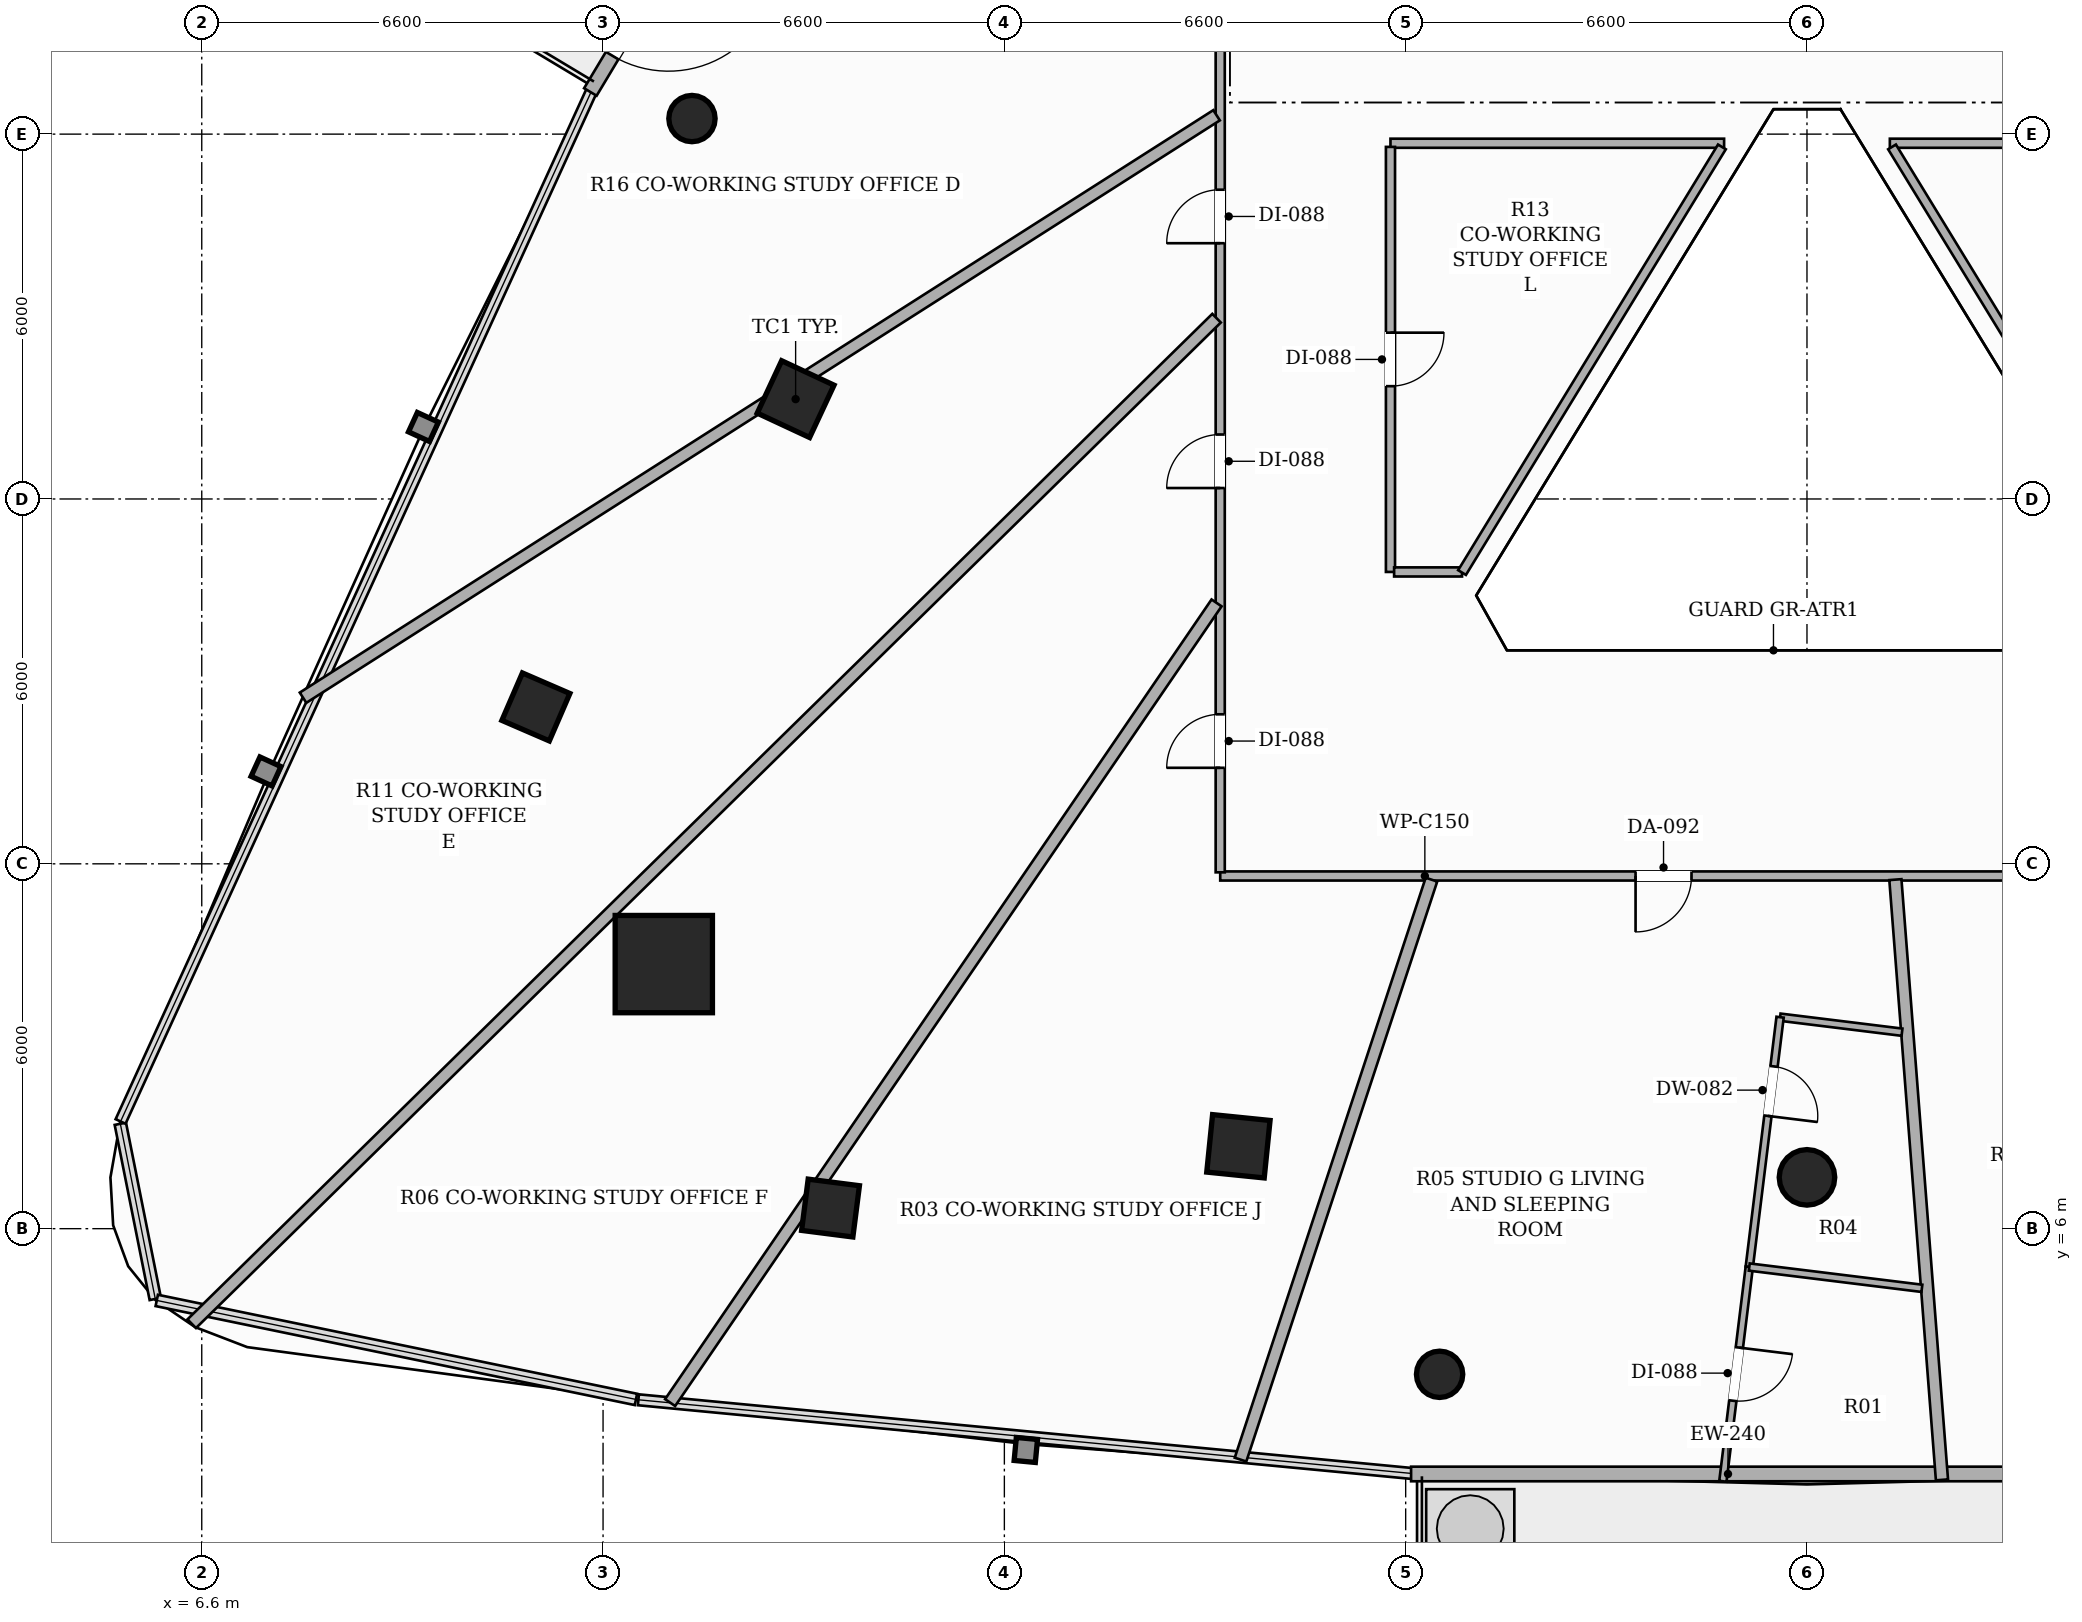
"""IFC4 building model, lengths in metres.
Left out: names, types, materials, properties, quantities, classifications, styles, units other than length and angle.
Written with IfcOpenShell. Run it as: python <this file> out.ifc"""

import sys

from ifc_helpers import new_model, si_unit, direction, frame, frame_2d, origin, origin_2d, place, context, subcontext, project, spatial, rectangle, hollow_rectangle, hollow_circle, extrude, element, fill, save


model = new_model("IFC4")
c1 = context("Model", 3, precision=1e-05, world=origin(), true_north=direction((0.0, 1.0)))
c2 = subcontext(c1, "Body", "Model", "MODEL_VIEW")
j1 = project(units=[si_unit("LENGTHUNIT", "METRE"), si_unit("PLANEANGLEUNIT", "RADIAN")], contexts=[c1])
p1 = place(None, origin())
s1 = spatial("IfcSite", under=j1, at=p1, CompositionType="ELEMENT")
p2 = place(p1, origin())
s2 = spatial("IfcBuilding", under=s1, at=p2, CompositionType="ELEMENT")
p3 = place(p2, frame((0.0, 0.0, 64.25)))
s3 = spatial("IfcBuildingStorey", under=s2, at=p3, CompositionType="ELEMENT", Elevation=64.25)
p4 = place(p3, frame((14.199, 10.351, 0.0), z_axis=(0.0, 0.0, 1.0), x_axis=(1.0, 0.0, 0.0)))
e1 = element("IfcColumn", 1, at=p4, inside=s3, PredefinedType="COLUMN", context=c2, shape_type="SweptSolid", body=[
    extrude(hollow_rectangle(XDim=1.6, YDim=1.6, WallThickness=0.05, at=origin_2d()), origin(), (0.0, 0.0, 1.0), 3.3),
])
for number, where, z_axis, x_axis in (
    (2, (16.367, 19.642, 0.0), (0.0, 0.0, 1.0), (0.423, 0.906, 0.0)),
    (3, (23.649, 7.355, 0.0), (0.0, 0.0, 1.0), (-0.995, 0.101, 0.0)),
):
    element("IfcColumn", number, at=place(p3, frame(where, z_axis=z_axis, x_axis=x_axis)), inside=s3, PredefinedType="COLUMN", context=c2, shape_type="SweptSolid", body=[
        extrude(hollow_rectangle(XDim=0.95, YDim=0.95, WallThickness=0.032, at=origin_2d()), origin(), (0.0, 0.0, 1.0), 3.3),
    ])
p5 = place(p3, frame((33.0, 6.844, 0.0), z_axis=(0.0, 0.0, 1.0), x_axis=(1.0, 0.0, 0.0)))
e4 = element("IfcColumn", 4, at=p5, inside=s3, PredefinedType="COLUMN", context=c2, shape_type="SweptSolid", body=[
    extrude(hollow_circle(Radius=0.457, WallThickness=0.025, at=origin_2d()), origin(), (0.0, 0.0, 1.0), 3.3),
])
for number, where, z_axis, x_axis in (
    (5, (12.095, 14.58, 0.0), (0.0, 0.0, 1.0), (0.397, 0.918, 0.0)),
    (6, (16.941, 6.339, 0.0), (0.0, 0.0, 1.0), (-0.992, 0.127, 0.0)),
):
    element("IfcColumn", number, at=place(p3, frame(where, z_axis=z_axis, x_axis=x_axis)), inside=s3, PredefinedType="COLUMN", context=c2, shape_type="SweptSolid", body=[
        extrude(hollow_rectangle(XDim=0.85, YDim=0.85, WallThickness=0.028, at=origin_2d()), origin(), (0.0, 0.0, 1.0), 3.3),
    ])
for number, where, z_axis, x_axis in (
    (7, (14.662, 24.256, 0.0), (0.0, 0.0, 1.0), (1.0, 0.0, 0.0)),
    (8, (26.958, 3.605, 0.0), (0.0, 0.0, 1.0), (1.0, 0.0, 0.0)),
):
    element("IfcColumn", number, at=place(p3, frame(where, z_axis=z_axis, x_axis=x_axis)), inside=s3, PredefinedType="COLUMN", context=c2, shape_type="SweptSolid", body=[
        extrude(hollow_circle(Radius=0.381, WallThickness=0.022, at=origin_2d()), origin(), (0.0, 0.0, 1.0), 3.3),
    ])
p6 = place(p3, frame((19.473, 35.501, 0.0), z_axis=(0.0, 0.0, 1.0), x_axis=(-0.514333361126, -0.857590341382, 0.0)))
e9 = element("IfcWall", 9, at=p6, inside=s3, PredefinedType="SOLIDWALL", context=c2, shape_type="SweptSolid", body=[
    extrude(rectangle(XDim=12.603, YDim=0.24, at=frame_2d((6.301, 0.0))), origin(), (0.0, 0.0, 1.0), 2.624),
])
p7 = place(p6, frame((10.105, 0.0, 0.0)))
e10 = element("IfcOpeningElement", 10, at=p7, cuts=e9, PredefinedType="OPENING", context=c2, shape_type="SweptSolid", body=[
    extrude(rectangle(XDim=1.8, YDim=2.2, at=frame_2d((0.9, 1.1))), frame((0.0, 0.13, 0.0), z_axis=(0.0, -1.0, 0.0), x_axis=(1.0, 0.0, 0.0)), (0.0, 0.0, 1.0), 0.26),
])
p8 = place(p3, frame((26.489, 1.966, 0.0), z_axis=(0.0, 0.0, 1.0), x_axis=(1.0, 0.0, 0.0)))
e11 = element("IfcWall", 11, at=p8, inside=s3, PredefinedType="SOLIDWALL", context=c2, shape_type="SweptSolid", body=[
    extrude(rectangle(XDim=13.022, YDim=0.24, at=frame_2d((6.511, 0.0))), origin(), (0.0, 0.0, 1.0), 2.624),
])
p9 = place(p8, frame((10.524, 0.0, 0.0)))
e12 = element("IfcOpeningElement", 12, at=p9, cuts=e11, PredefinedType="OPENING", context=c2, shape_type="SweptSolid", body=[
    extrude(rectangle(XDim=1.8, YDim=2.2, at=frame_2d((0.9, 1.1))), frame((0.0, 0.13, 0.0), z_axis=(0.0, -1.0, 0.0), x_axis=(1.0, 0.0, 0.0)), (0.0, 0.0, 1.0), 0.26),
])
p10 = place(p3, frame((42.59, 11.8, 0.0), z_axis=(0.0, 0.0, 1.0), x_axis=(-1.0, 0.0, 0.0)))
e13 = element("IfcWall", 13, at=p10, inside=s3, PredefinedType="PARTITIONING", context=c2, shape_type="SweptSolid", body=[
    extrude(rectangle(XDim=19.24, YDim=0.15, at=frame_2d((9.62, 0.0))), origin(), (0.0, 0.0, 1.0), 2.669),
])
p11 = place(p10, frame((11.489, 0.0, 0.0)))
e14 = element("IfcOpeningElement", 14, at=p11, cuts=e13, PredefinedType="OPENING", context=c2, shape_type="SweptSolid", body=[
    extrude(rectangle(XDim=0.92, YDim=2.15, at=frame_2d((0.46, 1.075))), frame((0.0, 0.085, 0.0), z_axis=(0.0, -1.0, 0.0), x_axis=(1.0, 0.0, 0.0)), (0.0, 0.0, 1.0), 0.17),
])
p12 = place(p10, frame((3.787, 0.0, 0.0)))
e15 = element("IfcOpeningElement", 15, at=p12, cuts=e13, PredefinedType="OPENING", context=c2, shape_type="SweptSolid", body=[
    extrude(rectangle(XDim=0.92, YDim=2.15, at=frame_2d((0.46, 1.075))), frame((0.0, 0.085, 0.0), z_axis=(0.0, -1.0, 0.0), x_axis=(1.0, 0.0, 0.0)), (0.0, 0.0, 1.0), 0.17),
])
p13 = place(p3, frame((23.35, 11.86, 0.0), z_axis=(0.0, 0.0, 1.0), x_axis=(0.0, 1.0, 0.0)))
e16 = element("IfcWall", 16, at=p13, inside=s3, PredefinedType="PARTITIONING", context=c2, shape_type="SweptSolid", body=[
    extrude(rectangle(XDim=25.04, YDim=0.15, at=frame_2d((12.52, 0.0))), origin(), (0.0, 0.0, 1.0), 2.413),
])
p14 = place(p13, frame((18.154, 0.0, 0.0)))
e17 = element("IfcOpeningElement", 17, at=p14, cuts=e16, PredefinedType="OPENING", context=c2, shape_type="SweptSolid", body=[
    extrude(rectangle(XDim=0.88, YDim=2.1, at=frame_2d((0.44, 1.05))), frame((0.0, 0.085, 0.0), z_axis=(0.0, -1.0, 0.0), x_axis=(1.0, 0.0, 0.0)), (0.0, 0.0, 1.0), 0.17),
])
p15 = place(p13, frame((10.346, 0.0, 0.0)))
e18 = element("IfcOpeningElement", 18, at=p15, cuts=e16, PredefinedType="OPENING", context=c2, shape_type="SweptSolid", body=[
    extrude(rectangle(XDim=0.88, YDim=2.1, at=frame_2d((0.44, 1.05))), frame((0.0, 0.085, 0.0), z_axis=(0.0, -1.0, 0.0), x_axis=(1.0, 0.0, 0.0)), (0.0, 0.0, 1.0), 0.17),
])
p16 = place(p13, frame((6.32, 0.0, 0.0)))
e19 = element("IfcOpeningElement", 19, at=p16, cuts=e16, PredefinedType="OPENING", context=c2, shape_type="SweptSolid", body=[
    extrude(rectangle(XDim=0.88, YDim=2.1, at=frame_2d((0.44, 1.05))), frame((0.0, 0.085, 0.0), z_axis=(0.0, -1.0, 0.0), x_axis=(1.0, 0.0, 0.0)), (0.0, 0.0, 1.0), 0.17),
])
p17 = place(p13, frame((1.719, 0.0, 0.0)))
e20 = element("IfcOpeningElement", 20, at=p17, cuts=e16, PredefinedType="OPENING", context=c2, shape_type="SweptSolid", body=[
    extrude(rectangle(XDim=0.88, YDim=2.1, at=frame_2d((0.44, 1.05))), frame((0.0, 0.085, 0.0), z_axis=(0.0, -1.0, 0.0), x_axis=(1.0, 0.0, 0.0)), (0.0, 0.0, 1.0), 0.17),
])
p18 = place(p3, frame((31.637, 23.85, 0.0), z_axis=(0.0, 0.0, 1.0), x_axis=(-1.0, 0.0, 0.0)))
e21 = element("IfcWall", 21, at=p18, inside=s3, PredefinedType="PARTITIONING", context=c2, shape_type="SweptSolid", body=[
    extrude(rectangle(XDim=5.487, YDim=0.15, at=frame_2d((2.744, 0.0))), origin(), (0.0, 0.0, 1.0), 2.669),
])
p19 = place(p3, frame((26.15, 23.79, 0.0), z_axis=(0.0, 0.0, 1.0), x_axis=(0.0, -1.0, 0.0)))
e22 = element("IfcWall", 22, at=p19, inside=s3, PredefinedType="PARTITIONING", context=c2, shape_type="SweptSolid", body=[
    extrude(rectangle(XDim=6.99, YDim=0.15, at=frame_2d((3.495, 0.0))), origin(), (0.0, 0.0, 1.0), 2.669),
])
p20 = place(p19, frame((3.055, 0.0, 0.0)))
e23 = element("IfcOpeningElement", 23, at=p20, cuts=e22, PredefinedType="OPENING", context=c2, shape_type="SweptSolid", body=[
    extrude(rectangle(XDim=0.88, YDim=2.1, at=frame_2d((0.44, 1.05))), frame((0.0, 0.085, 0.0), z_axis=(0.0, -1.0, 0.0), x_axis=(1.0, 0.0, 0.0)), (0.0, 0.0, 1.0), 0.17),
])
p21 = place(p3, frame((26.21, 16.8, 0.0), z_axis=(0.0, 0.0, 1.0), x_axis=(1.0, 0.0, 0.0)))
e24 = element("IfcWall", 24, at=p21, inside=s3, PredefinedType="PARTITIONING", context=c2, shape_type="SweptSolid", body=[
    extrude(rectangle(XDim=1.117, YDim=0.15, at=frame_2d((0.559, 0.0))), origin(), (0.0, 0.0, 1.0), 3.06),
])
p22 = place(p3, frame((39.79, 23.85, 0.0), z_axis=(0.0, 0.0, 1.0), x_axis=(-1.0, 0.0, 0.0)))
e25 = element("IfcWall", 25, at=p22, inside=s3, PredefinedType="PARTITIONING", context=c2, shape_type="SweptSolid", body=[
    extrude(rectangle(XDim=5.427, YDim=0.15, at=frame_2d((2.713, 0.0))), origin(), (0.0, 0.0, 1.0), 2.669),
])
p23 = place(p3, frame((27.327, 16.79, 0.0), z_axis=(0.0, 0.0, 1.0), x_axis=(0.521129693902, 0.853477499489, 0.0)))
e26 = element("IfcWall", 26, at=p23, inside=s3, PredefinedType="PARTITIONING", context=c2, shape_type="SweptSolid", body=[
    extrude(rectangle(XDim=8.202, YDim=0.15, at=frame_2d((4.101, 0.0))), origin(), (0.0, 0.0, 1.0), 2.669),
])
p24 = place(p3, frame((34.399, 23.79, 0.0), z_axis=(0.0, 0.0, 1.0), x_axis=(0.521619930676, -0.853177969665, 0.0)))
e27 = element("IfcWall", 27, at=p24, inside=s3, PredefinedType="PARTITIONING", context=c2, shape_type="SweptSolid", body=[
    extrude(rectangle(XDim=8.194, YDim=0.15, at=frame_2d((4.097, 0.0))), origin(), (0.0, 0.0, 1.0), 2.669),
])
p25 = place(p3, frame((23.29, 24.31, 0.0), z_axis=(0.0, 0.0, 1.0), x_axis=(-0.843217726059, -0.537572196509, 0.0)))
e28 = element("IfcWall", 28, at=p25, inside=s3, PredefinedType="PARTITIONING", context=c2, shape_type="SweptSolid", body=[
    extrude(rectangle(XDim=17.817, YDim=0.2, at=frame_2d((8.909, 0.0))), origin(), (0.0, 0.0, 1.0), 2.413),
])
p26 = place(p3, frame((23.29, 20.973, 0.0), z_axis=(0.0, 0.0, 1.0), x_axis=(-0.713831483248, -0.70031750908, 0.0)))
e29 = element("IfcWall", 29, at=p26, inside=s3, PredefinedType="PARTITIONING", context=c2, shape_type="SweptSolid", body=[
    extrude(rectangle(XDim=23.612, YDim=0.2, at=frame_2d((11.806, 0.0))), origin(), (0.0, 0.0, 1.0), 2.413),
])
p27 = place(p3, frame((23.29, 16.291, 0.0), z_axis=(0.0, 0.0, 1.0), x_axis=(-0.564210182678, -0.825631194761, 0.0)))
e30 = element("IfcWall", 30, at=p27, inside=s3, PredefinedType="PARTITIONING", context=c2, shape_type="SweptSolid", body=[
    extrude(rectangle(XDim=15.928, YDim=0.2, at=frame_2d((7.964, 0.0))), origin(), (0.0, 0.0, 1.0), 2.413),
])
p28 = place(p3, frame((34.454, 11.74, 0.0), z_axis=(0.0, 0.0, 1.0), x_axis=(0.077354581403, -0.997003645297, 0.0)))
e31 = element("IfcWall", 31, at=p28, inside=s3, PredefinedType="PARTITIONING", context=c2, shape_type="SweptSolid", body=[
    extrude(rectangle(XDim=9.901, YDim=0.2, at=frame_2d((4.95, 0.0))), origin(), (0.0, 0.0, 1.0), 2.413),
])
p29 = place(p3, frame((23.684, 2.202, 0.0), z_axis=(0.0, 0.0, 1.0), x_axis=(0.31268804242, 0.949855877556, 0.0)))
e32 = element("IfcWall", 32, at=p29, inside=s3, PredefinedType="PARTITIONING", context=c2, shape_type="SweptSolid", body=[
    extrude(rectangle(XDim=10.042, YDim=0.2, at=frame_2d((5.021, 0.0))), origin(), (0.0, 0.0, 1.0), 2.413),
])
p30 = place(p3, frame((34.563, 9.231, 0.0), z_axis=(0.0, 0.0, 1.0), x_axis=(-0.992492062854, 0.122309055968, 0.0)))
e33 = element("IfcWall", 33, at=p30, inside=s3, PredefinedType="PARTITIONING", context=c2, shape_type="SweptSolid", body=[
    extrude(rectangle(XDim=2.02, YDim=0.12, at=frame_2d((1.01, 0.0))), origin(), (0.0, 0.0, 1.0), 2.669),
])
p31 = place(p3, frame((32.558, 9.478, 0.0), z_axis=(0.0, 0.0, 1.0), x_axis=(-0.122474226657, -0.992471694208, 0.0)))
e34 = element("IfcWall", 34, at=p31, inside=s3, PredefinedType="PARTITIONING", context=c2, shape_type="SweptSolid", body=[
    extrude(rectangle(XDim=4.14, YDim=0.12, at=frame_2d((2.07, 0.0))), origin(), (0.0, 0.0, 1.0), 2.413),
])
p32 = place(p31, frame((0.816, 0.0, 0.0)))
e35 = element("IfcOpeningElement", 35, at=p32, cuts=e34, PredefinedType="OPENING", context=c2, shape_type="SweptSolid", body=[
    extrude(rectangle(XDim=0.82, YDim=2.1, at=frame_2d((0.41, 1.05))), frame((0.0, 0.07, 0.0), z_axis=(0.0, -1.0, 0.0), x_axis=(1.0, 0.0, 0.0)), (0.0, 0.0, 1.0), 0.14),
])
p33 = place(p3, frame((32.051, 5.369, 0.0), z_axis=(0.0, 0.0, 1.0), x_axis=(-0.122290707402, -0.992494323854, 0.0)))
e36 = element("IfcWall", 36, at=p33, inside=s3, PredefinedType="PARTITIONING", context=c2, shape_type="SweptSolid", body=[
    extrude(rectangle(XDim=3.55, YDim=0.12, at=frame_2d((1.775, 0.0))), origin(), (0.0, 0.0, 1.0), 3.06),
])
p34 = place(p33, frame((1.335, 0.0, 0.0)))
e37 = element("IfcOpeningElement", 37, at=p34, cuts=e36, PredefinedType="OPENING", context=c2, shape_type="SweptSolid", body=[
    extrude(rectangle(XDim=0.88, YDim=2.1, at=frame_2d((0.44, 1.05))), frame((0.0, 0.07, 0.0), z_axis=(0.0, -1.0, 0.0), x_axis=(1.0, 0.0, 0.0)), (0.0, 0.0, 1.0), 0.14),
])
p35 = place(p3, frame((34.89, 5.019, 0.0), z_axis=(0.0, 0.0, 1.0), x_axis=(-0.992491734807, 0.12231171792, 0.0)))
e38 = element("IfcWall", 38, at=p35, inside=s3, PredefinedType="PARTITIONING", context=c2, shape_type="SweptSolid", body=[
    extrude(rectangle(XDim=2.86, YDim=0.12, at=frame_2d((1.43, 0.0))), origin(), (0.0, 0.0, 1.0), 3.06),
])
p36 = place(p7, origin())
e39 = element("IfcDoor", 39, at=p36, inside=s3, OperationType="SINGLE_SWING_LEFT", PredefinedType="DOOR", context=c2, shape_type="SweptSolid", body=[
    extrude(rectangle(XDim=1.8, YDim=2.2, at=frame_2d((0.9, 1.1))), frame((0.0, 0.025, 0.0), z_axis=(0.0, -1.0, 0.0), x_axis=(1.0, 0.0, 0.0)), (0.0, 0.0, 1.0), 0.05),
])
fill(e10, e39)
p37 = place(p15, origin())
e40 = element("IfcDoor", 40, at=p37, inside=s3, OperationType="SINGLE_SWING_LEFT", PredefinedType="DOOR", context=c2, shape_type="SweptSolid", body=[
    extrude(rectangle(XDim=0.88, YDim=2.1, at=frame_2d((0.44, 1.05))), frame((0.0, 0.025, 0.0), z_axis=(0.0, -1.0, 0.0), x_axis=(1.0, 0.0, 0.0)), (0.0, 0.0, 1.0), 0.05),
])
fill(e18, e40)
p38 = place(p16, origin())
e41 = element("IfcDoor", 41, at=p38, inside=s3, OperationType="SINGLE_SWING_LEFT", PredefinedType="DOOR", context=c2, shape_type="SweptSolid", body=[
    extrude(rectangle(XDim=0.88, YDim=2.1, at=frame_2d((0.44, 1.05))), frame((0.0, 0.025, 0.0), z_axis=(0.0, -1.0, 0.0), x_axis=(1.0, 0.0, 0.0)), (0.0, 0.0, 1.0), 0.05),
])
fill(e19, e41)
p39 = place(p11, origin())
e42 = element("IfcDoor", 42, at=p39, inside=s3, OperationType="SINGLE_SWING_RIGHT", PredefinedType="DOOR", context=c2, shape_type="SweptSolid", body=[
    extrude(rectangle(XDim=0.92, YDim=2.15, at=frame_2d((0.46, 1.075))), frame((0.0, 0.025, 0.0), z_axis=(0.0, -1.0, 0.0), x_axis=(1.0, 0.0, 0.0)), (0.0, 0.0, 1.0), 0.05),
])
fill(e14, e42)
p40 = place(p32, origin())
e43 = element("IfcDoor", 43, at=p40, inside=s3, OperationType="SINGLE_SWING_RIGHT", PredefinedType="DOOR", context=c2, shape_type="SweptSolid", body=[
    extrude(rectangle(XDim=0.82, YDim=2.1, at=frame_2d((0.41, 1.05))), frame((0.0, 0.025, 0.0), z_axis=(0.0, -1.0, 0.0), x_axis=(1.0, 0.0, 0.0)), (0.0, 0.0, 1.0), 0.05),
])
fill(e35, e43)
p41 = place(p34, origin())
e44 = element("IfcDoor", 44, at=p41, inside=s3, OperationType="SINGLE_SWING_LEFT", PredefinedType="DOOR", context=c2, shape_type="SweptSolid", body=[
    extrude(rectangle(XDim=0.88, YDim=2.1, at=frame_2d((0.44, 1.05))), frame((0.0, 0.025, 0.0), z_axis=(0.0, -1.0, 0.0), x_axis=(1.0, 0.0, 0.0)), (0.0, 0.0, 1.0), 0.05),
])
fill(e37, e44)
p42 = place(p17, origin())
e45 = element("IfcDoor", 45, at=p42, inside=s3, OperationType="SINGLE_SWING_LEFT", PredefinedType="DOOR", context=c2, shape_type="SweptSolid", body=[
    extrude(rectangle(XDim=0.88, YDim=2.1, at=frame_2d((0.44, 1.05))), frame((0.0, 0.025, 0.0), z_axis=(0.0, -1.0, 0.0), x_axis=(1.0, 0.0, 0.0)), (0.0, 0.0, 1.0), 0.05),
])
fill(e20, e45)
p43 = place(p20, origin())
e46 = element("IfcDoor", 46, at=p43, inside=s3, OperationType="SINGLE_SWING_LEFT", PredefinedType="DOOR", context=c2, shape_type="SweptSolid", body=[
    extrude(rectangle(XDim=0.88, YDim=2.1, at=frame_2d((0.44, 1.05))), frame((0.0, 0.025, 0.0), z_axis=(0.0, -1.0, 0.0), x_axis=(1.0, 0.0, 0.0)), (0.0, 0.0, 1.0), 0.05),
])
fill(e23, e46)
save(model, sys.argv[1])
